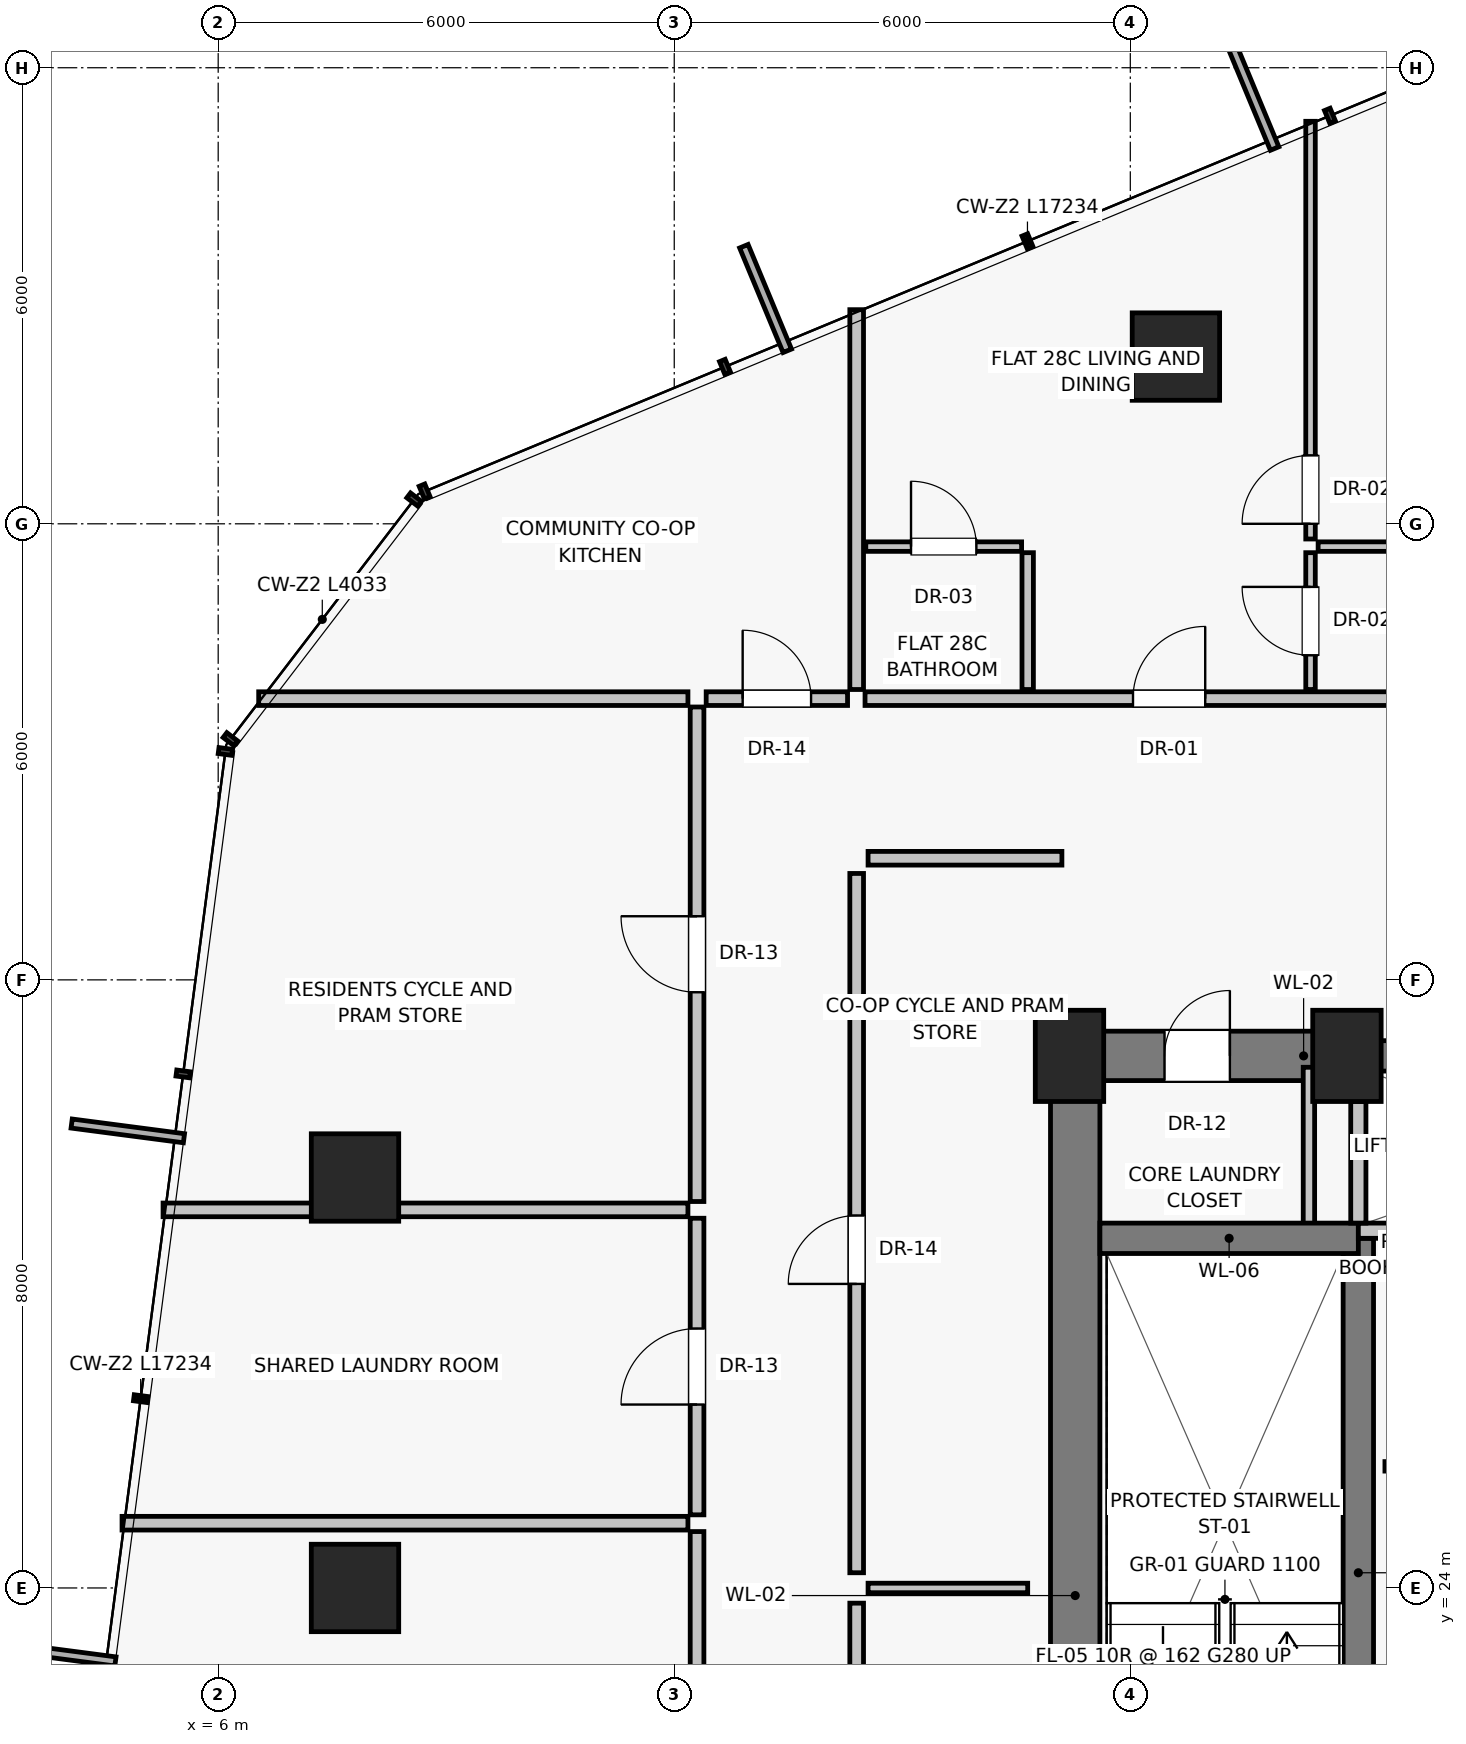
"""IFC4 building model, lengths in metres.
Left out: names, types, materials, properties, quantities, classifications, styles, units other than length and angle.
Written with IfcOpenShell. Run it as: python <this file> out.ifc"""

import sys

from ifc_helpers import new_model, si_unit, direction, frame, frame_2d, origin, origin_2d, place, context, subcontext, project, spatial, rectangle, extrude, source, transform, mapped, element, fill, save


model = new_model("IFC4")
c1 = context("Model", 3, precision=1e-05, world=origin(), true_north=direction((0.0, 1.0)))
c2 = subcontext(c1, "Body", "Model", "MODEL_VIEW")
j1 = project(units=[si_unit("LENGTHUNIT", "METRE"), si_unit("PLANEANGLEUNIT", "RADIAN")], contexts=[c1])
p1 = place(None, origin())
s1 = spatial("IfcSite", under=j1, at=p1, CompositionType="ELEMENT")
p2 = place(p1, origin())
s2 = spatial("IfcBuilding", under=s1, at=p2, CompositionType="ELEMENT")
p3 = place(p2, frame((0.0, 0.0, 102.45)))
s3 = spatial("IfcBuildingStorey", under=s2, at=p3, CompositionType="ELEMENT", Elevation=102.45)
for number, where, z_axis, x_axis in (
    (1, (17.2, 31.0, 0.0), (0.0, 0.0, 1.0), (1.0, 0.0, 0.0)),
    (2, (20.85, 31.0, 0.0), (0.0, 0.0, 1.0), (1.0, 0.0, 0.0)),
):
    element("IfcColumn", number, at=place(p3, frame(where, z_axis=z_axis, x_axis=x_axis)), inside=s3, PredefinedType="PILASTER", context=c2, shape_type="SweptSolid", body=[
        extrude(rectangle(XDim=0.9, YDim=1.2, at=origin_2d()), origin(), (0.0, 0.0, 1.0), 3.25),
    ])
for number, where, z_axis, x_axis in (
    (3, (18.6, 40.2, 0.0), (0.0, 0.0, 1.0), (1.0, 0.0, 0.0)),
    (4, (7.8, 29.4, 0.0), (0.0, 0.0, 1.0), (1.0, 0.0, 0.0)),
    (5, (7.8, 24.0, 0.0), (0.0, 0.0, 1.0), (1.0, 0.0, 0.0)),
):
    element("IfcColumn", number, at=place(p3, frame(where, z_axis=z_axis, x_axis=x_axis)), inside=s3, PredefinedType="COLUMN", context=c2, shape_type="SweptSolid", body=[
        extrude(rectangle(XDim=1.15, YDim=1.15, at=origin_2d()), origin(), (0.0, 0.0, 1.0), 3.25),
    ])
p4 = place(p3, frame((17.275, 16.8, 0.0), z_axis=(0.0, 0.0, 1.0), x_axis=(0.0, 1.0, 0.0)))
e6 = element("IfcWall", 6, at=p4, inside=s3, PredefinedType="SHEAR", context=c2, shape_type="SweptSolid", body=[
    extrude(rectangle(XDim=14.2, YDim=0.65, at=frame_2d((7.1, 0.0))), origin(), (0.0, 0.0, 1.0), 3.0),
])
p5 = place(p3, frame((17.2, 31.0, 0.0), z_axis=(0.0, 0.0, 1.0), x_axis=(1.0, 0.0, 0.0)))
e7 = element("IfcWall", 7, at=p5, inside=s3, PredefinedType="SHEAR", context=c2, shape_type="SweptSolid", body=[
    extrude(rectangle(XDim=3.8, YDim=0.65, at=frame_2d((1.9, 0.0))), origin(), (0.0, 0.0, 1.0), 3.0),
])
p6 = place(p5, frame((1.25, 0.0, 0.0)))
e8 = element("IfcOpeningElement", 8, at=p6, cuts=e7, PredefinedType="OPENING", context=c2, shape_type="SweptSolid", body=[
    extrude(rectangle(XDim=0.86, YDim=2.01, at=frame_2d((0.43, 1.005))), frame((0.0, 0.335, 0.0), z_axis=(0.0, -1.0, 0.0), x_axis=(1.0, 0.0, 0.0)), (0.0, 0.0, 1.0), 0.67),
])
p7 = place(p3, frame((21.0, 31.0, 0.0), z_axis=(0.0, 0.0, 1.0), x_axis=(1.0, 0.0, 0.0)))
e9 = element("IfcWall", 9, at=p7, inside=s3, PredefinedType="SHEAR", context=c2, shape_type="SweptSolid", body=[
    extrude(rectangle(XDim=6.0, YDim=0.4, at=frame_2d((3.0, 0.0))), origin(), (0.0, 0.0, 1.0), 3.0),
])
p8 = place(p3, frame((20.35, 28.65, 0.0), z_axis=(0.0, 0.0, 1.0), x_axis=(0.0, 1.0, 0.0)))
e10 = element("IfcWall", 10, at=p8, inside=s3, PredefinedType="PARTITIONING", context=c2, shape_type="SweptSolid", body=[
    extrude(rectangle(XDim=2.2, YDim=0.15, at=frame_2d((1.1, 0.0))), origin(), (0.0, 0.0, 1.0), 3.0),
])
p9 = place(p3, frame((21.0, 19.8, 0.0), z_axis=(0.0, 0.0, 1.0), x_axis=(0.0, 1.0, 0.0)))
e11 = element("IfcWall", 11, at=p9, inside=s3, PredefinedType="SHEAR", context=c2, shape_type="SweptSolid", body=[
    extrude(rectangle(XDim=8.8, YDim=0.4, at=frame_2d((4.4, 0.0))), origin(), (0.0, 0.0, 1.0), 3.0),
])
p10 = place(p3, frame((17.6, 28.6, 0.0), z_axis=(0.0, 0.0, 1.0), x_axis=(1.0, 0.0, 0.0)))
e12 = element("IfcWall", 12, at=p10, inside=s3, PredefinedType="SHEAR", context=c2, shape_type="SweptSolid", body=[
    extrude(rectangle(XDim=3.4, YDim=0.4, at=frame_2d((1.7, 0.0))), origin(), (0.0, 0.0, 1.0), 3.0),
])
p11 = place(p3, frame((21.0, 28.7, 0.0), z_axis=(0.0, 0.0, 1.0), x_axis=(1.0, 0.0, 0.0)))
e13 = element("IfcWall", 13, at=p11, inside=s3, PredefinedType="SOLIDWALL", context=c2, shape_type="SweptSolid", body=[
    extrude(rectangle(XDim=6.0, YDim=0.2, at=frame_2d((3.0, 0.0))), origin(), (0.0, 0.0, 1.0), 3.0),
])
p12 = place(p3, frame((21.0, 28.8, 0.0), z_axis=(0.0, 0.0, 1.0), x_axis=(0.0, 1.0, 0.0)))
e14 = element("IfcWall", 14, at=p12, inside=s3, PredefinedType="SOLIDWALL", context=c2, shape_type="SweptSolid", body=[
    extrude(rectangle(XDim=1.6, YDim=0.2, at=frame_2d((0.8, 0.0))), origin(), (0.0, 0.0, 1.0), 3.0),
])
p13 = place(p3, frame((21.35, 25.6, 0.0), z_axis=(0.0, 0.0, 1.0), x_axis=(1.0, 0.0, 0.0)))
e15 = element("IfcWall", 15, at=p13, inside=s3, PredefinedType="PARTITIONING", context=c2, shape_type="SweptSolid", body=[
    extrude(rectangle(XDim=2.4, YDim=0.125, at=frame_2d((1.2, 0.0))), origin(), (0.0, 0.0, 1.0), 3.0),
])
p14 = place(p3, frame((14.4, 14.4, 0.0), z_axis=(0.0, 0.0, 1.0), x_axis=(0.0, 1.0, 0.0)))
e16 = element("IfcWall", 16, at=p14, inside=s3, PredefinedType="PARTITIONING", context=c2, shape_type="SweptSolid", body=[
    extrude(rectangle(XDim=9.4, YDim=0.18, at=frame_2d((4.7, 0.0))), origin(), (0.0, 0.0, 1.0), 3.0),
])
p15 = place(p14, frame((3.8, 0.0, 0.0)))
e17 = element("IfcOpeningElement", 17, at=p15, cuts=e16, PredefinedType="OPENING", context=c2, shape_type="SweptSolid", body=[
    extrude(rectangle(XDim=0.9, YDim=2.01, at=frame_2d((0.45, 1.005))), frame((0.0, 0.1, 0.0), z_axis=(0.0, -1.0, 0.0), x_axis=(1.0, 0.0, 0.0)), (0.0, 0.0, 1.0), 0.2),
])
p16 = place(p3, frame((14.4, 24.2, 0.0), z_axis=(0.0, 0.0, 1.0), x_axis=(0.0, 1.0, 0.0)))
e18 = element("IfcWall", 18, at=p16, inside=s3, PredefinedType="PARTITIONING", context=c2, shape_type="SweptSolid", body=[
    extrude(rectangle(XDim=9.2, YDim=0.18, at=frame_2d((4.6, 0.0))), origin(), (0.0, 0.0, 1.0), 3.0),
])
p17 = place(p16, frame((3.8, 0.0, 0.0)))
e19 = element("IfcOpeningElement", 19, at=p17, cuts=e18, PredefinedType="OPENING", context=c2, shape_type="SweptSolid", body=[
    extrude(rectangle(XDim=0.9, YDim=2.01, at=frame_2d((0.45, 1.005))), frame((0.0, 0.1, 0.0), z_axis=(0.0, -1.0, 0.0), x_axis=(1.0, 0.0, 0.0)), (0.0, 0.0, 1.0), 0.2),
])
p18 = place(p3, frame((14.55, 24.0, 0.0), z_axis=(0.0, 0.0, 1.0), x_axis=(1.0, 0.0, 0.0)))
e20 = element("IfcWall", 20, at=p18, inside=s3, PredefinedType="PARTITIONING", context=c2, shape_type="SweptSolid", body=[
    extrude(rectangle(XDim=2.1, YDim=0.125, at=frame_2d((1.05, 0.0))), origin(), (0.0, 0.0, 1.0), 3.0),
])
p19 = place(p3, frame((14.55, 33.6, 0.0), z_axis=(0.0, 0.0, 1.0), x_axis=(1.0, 0.0, 0.0)))
e21 = element("IfcWall", 21, at=p19, inside=s3, PredefinedType="PARTITIONING", context=c2, shape_type="SweptSolid", body=[
    extrude(rectangle(XDim=2.55, YDim=0.18, at=frame_2d((1.275, 0.0))), origin(), (0.0, 0.0, 1.0), 3.0),
])
p20 = place(p3, frame((14.4, 35.82, 0.0), z_axis=(0.0, 0.0, 1.0), x_axis=(0.0, 1.0, 0.0)))
e22 = element("IfcWall", 22, at=p20, inside=s3, PredefinedType="PARTITIONING", context=c2, shape_type="SweptSolid", body=[
    extrude(rectangle(XDim=4.997, YDim=0.18, at=frame_2d((2.499, 0.0))), origin(), (0.0, 0.0, 1.0), 3.0),
])
p21 = place(p3, frame((14.51, 35.7, 0.0), z_axis=(0.0, 0.0, 1.0), x_axis=(1.0, 0.0, 0.0)))
e23 = element("IfcWall", 23, at=p21, inside=s3, PredefinedType="PARTITIONING", context=c2, shape_type="SweptSolid", body=[
    extrude(rectangle(XDim=10.636, YDim=0.18, at=frame_2d((5.318, 0.0))), origin(), (0.0, 0.0, 1.0), 2.58),
])
p22 = place(p21, frame((3.525, 0.0, 0.0)))
e24 = element("IfcOpeningElement", 24, at=p22, cuts=e23, PredefinedType="OPENING", context=c2, shape_type="SweptSolid", body=[
    extrude(rectangle(XDim=0.95, YDim=2.02, at=frame_2d((0.475, 1.01))), frame((0.0, 0.1, 0.0), z_axis=(0.0, -1.0, 0.0), x_axis=(1.0, 0.0, 0.0)), (0.0, 0.0, 1.0), 0.2),
])
p23 = place(p3, frame((16.65, 35.82, 0.0), z_axis=(0.0, 0.0, 1.0), x_axis=(0.0, 1.0, 0.0)))
e25 = element("IfcWall", 25, at=p23, inside=s3, PredefinedType="PARTITIONING", context=c2, shape_type="SweptSolid", body=[
    extrude(rectangle(XDim=1.8, YDim=0.15, at=frame_2d((0.9, 0.0))), origin(), (0.0, 0.0, 1.0), 3.0),
])
p24 = place(p3, frame((14.52, 37.7, 0.0), z_axis=(0.0, 0.0, 1.0), x_axis=(1.0, 0.0, 0.0)))
e26 = element("IfcWall", 26, at=p24, inside=s3, PredefinedType="PARTITIONING", context=c2, shape_type="SweptSolid", body=[
    extrude(rectangle(XDim=2.05, YDim=0.125, at=frame_2d((1.025, 0.0))), origin(), (0.0, 0.0, 1.0), 3.0),
])
p25 = place(p24, frame((0.595, 0.0, 0.0)))
e27 = element("IfcOpeningElement", 27, at=p25, cuts=e26, PredefinedType="OPENING", context=c2, shape_type="SweptSolid", body=[
    extrude(rectangle(XDim=0.86, YDim=2.01, at=frame_2d((0.43, 1.005))), frame((0.0, 0.073, 0.0), z_axis=(0.0, -1.0, 0.0), x_axis=(1.0, 0.0, 0.0)), (0.0, 0.0, 1.0), 0.145),
])
p26 = place(p3, frame((20.371, 35.82, 0.0), z_axis=(0.0, 0.0, 1.0), x_axis=(0.0, 1.0, 0.0)))
e28 = element("IfcWall", 28, at=p26, inside=s3, PredefinedType="PARTITIONING", context=c2, shape_type="SweptSolid", body=[
    extrude(rectangle(XDim=1.8, YDim=0.125, at=frame_2d((0.9, 0.0))), origin(), (0.0, 0.0, 1.0), 3.0),
])
p27 = place(p26, frame((0.45, 0.0, 0.0)))
e29 = element("IfcOpeningElement", 29, at=p27, cuts=e28, PredefinedType="OPENING", context=c2, shape_type="SweptSolid", body=[
    extrude(rectangle(XDim=0.9, YDim=2.01, at=frame_2d((0.45, 1.005))), frame((0.0, 0.073, 0.0), z_axis=(0.0, -1.0, 0.0), x_axis=(1.0, 0.0, 0.0)), (0.0, 0.0, 1.0), 0.145),
])
p28 = place(p3, frame((20.471, 37.7, 0.0), z_axis=(0.0, 0.0, 1.0), x_axis=(1.0, 0.0, 0.0)))
e30 = element("IfcWall", 30, at=p28, inside=s3, PredefinedType="PARTITIONING", context=c2, shape_type="SweptSolid", body=[
    extrude(rectangle(XDim=4.665, YDim=0.125, at=frame_2d((2.333, 0.0))), origin(), (0.0, 0.0, 1.0), 3.0),
])
p29 = place(p3, frame((20.371, 37.8, 0.0), z_axis=(0.0, 0.0, 1.0), x_axis=(0.0, 1.0, 0.0)))
e31 = element("IfcWall", 31, at=p29, inside=s3, PredefinedType="PARTITIONING", context=c2, shape_type="SweptSolid", body=[
    extrude(rectangle(XDim=5.495, YDim=0.125, at=frame_2d((2.748, 0.0))), origin(), (0.0, 0.0, 1.0), 3.0),
])
p30 = place(p29, frame((0.2, 0.0, 0.0)))
e32 = element("IfcOpeningElement", 32, at=p30, cuts=e31, PredefinedType="OPENING", context=c2, shape_type="SweptSolid", body=[
    extrude(rectangle(XDim=0.9, YDim=2.01, at=frame_2d((0.45, 1.005))), frame((0.0, 0.073, 0.0), z_axis=(0.0, -1.0, 0.0), x_axis=(1.0, 0.0, 0.0)), (0.0, 0.0, 1.0), 0.145),
])
p31 = place(p3, frame((12.18, 35.7, 0.0), z_axis=(0.0, 0.0, 1.0), x_axis=(-1.0, 0.0, 0.0)))
e33 = element("IfcWall", 33, at=p31, inside=s3, PredefinedType="PARTITIONING", context=c2, shape_type="SweptSolid", body=[
    extrude(rectangle(XDim=5.647, YDim=0.18, at=frame_2d((2.824, 0.0))), origin(), (0.0, 0.0, 1.0), 3.0),
])
p32 = place(p3, frame((12.3, 17.056, 0.0), z_axis=(0.0, 0.0, 1.0), x_axis=(0.0, 1.0, 0.0)))
e34 = element("IfcWall", 34, at=p32, inside=s3, PredefinedType="PARTITIONING", context=c2, shape_type="SweptSolid", body=[
    extrude(rectangle(XDim=7.686, YDim=0.18, at=frame_2d((3.843, 0.0))), origin(), (0.0, 0.0, 1.0), 2.58),
])
p33 = place(p32, frame((3.343, 0.0, 0.0)))
e35 = element("IfcOpeningElement", 35, at=p33, cuts=e34, PredefinedType="OPENING", context=c2, shape_type="SweptSolid", body=[
    extrude(rectangle(XDim=1.0, YDim=2.01, at=frame_2d((0.5, 1.005))), frame((0.0, 0.1, 0.0), z_axis=(0.0, -1.0, 0.0), x_axis=(1.0, 0.0, 0.0)), (0.0, 0.0, 1.0), 0.2),
])
p34 = place(p3, frame((12.18, 24.852, 0.0), z_axis=(0.0, 0.0, 1.0), x_axis=(-1.0, 0.0, 0.0)))
e36 = element("IfcWall", 36, at=p34, inside=s3, PredefinedType="PARTITIONING", context=c2, shape_type="SweptSolid", body=[
    extrude(rectangle(XDim=7.445, YDim=0.18, at=frame_2d((3.722, 0.0))), origin(), (0.0, 0.0, 1.0), 3.0),
])
p35 = place(p3, frame((12.3, 24.962, 0.0), z_axis=(0.0, 0.0, 1.0), x_axis=(0.0, 1.0, 0.0)))
e37 = element("IfcWall", 37, at=p35, inside=s3, PredefinedType="PARTITIONING", context=c2, shape_type="SweptSolid", body=[
    extrude(rectangle(XDim=3.902, YDim=0.18, at=frame_2d((1.951, 0.0))), origin(), (0.0, 0.0, 1.0), 2.58),
])
p36 = place(p35, frame((1.451, 0.0, 0.0)))
e38 = element("IfcOpeningElement", 38, at=p36, cuts=e37, PredefinedType="OPENING", context=c2, shape_type="SweptSolid", body=[
    extrude(rectangle(XDim=1.0, YDim=2.01, at=frame_2d((0.5, 1.005))), frame((0.0, 0.1, 0.0), z_axis=(0.0, -1.0, 0.0), x_axis=(1.0, 0.0, 0.0)), (0.0, 0.0, 1.0), 0.2),
])
p37 = place(p3, frame((12.3, 29.084, 0.0), z_axis=(0.0, 0.0, 1.0), x_axis=(0.0, 1.0, 0.0)))
e39 = element("IfcWall", 39, at=p37, inside=s3, PredefinedType="PARTITIONING", context=c2, shape_type="SweptSolid", body=[
    extrude(rectangle(XDim=6.506, YDim=0.18, at=frame_2d((3.253, 0.0))), origin(), (0.0, 0.0, 1.0), 2.58),
])
p38 = place(p37, frame((2.753, 0.0, 0.0)))
e40 = element("IfcOpeningElement", 40, at=p38, cuts=e39, PredefinedType="OPENING", context=c2, shape_type="SweptSolid", body=[
    extrude(rectangle(XDim=1.0, YDim=2.01, at=frame_2d((0.5, 1.005))), frame((0.0, 0.1, 0.0), z_axis=(0.0, -1.0, 0.0), x_axis=(1.0, 0.0, 0.0)), (0.0, 0.0, 1.0), 0.2),
])
p39 = place(p3, frame((12.18, 28.974, 0.0), z_axis=(0.0, 0.0, 1.0), x_axis=(-1.0, 0.0, 0.0)))
e41 = element("IfcWall", 41, at=p39, inside=s3, PredefinedType="PARTITIONING", context=c2, shape_type="SweptSolid", body=[
    extrude(rectangle(XDim=6.905, YDim=0.18, at=frame_2d((3.453, 0.0))), origin(), (0.0, 0.0, 1.0), 2.378),
])
p40 = place(p3, frame((12.42, 35.7, 0.0), z_axis=(0.0, 0.0, 1.0), x_axis=(1.0, 0.0, 0.0)))
e42 = element("IfcWall", 42, at=p40, inside=s3, PredefinedType="PARTITIONING", context=c2, shape_type="SweptSolid", body=[
    extrude(rectangle(XDim=1.86, YDim=0.18, at=frame_2d((0.93, 0.0))), origin(), (0.0, 0.0, 1.0), 3.0),
])
p41 = place(p40, frame((0.48, 0.0, 0.0)))
e43 = element("IfcOpeningElement", 43, at=p41, cuts=e42, PredefinedType="OPENING", context=c2, shape_type="SweptSolid", body=[
    extrude(rectangle(XDim=0.9, YDim=2.01, at=frame_2d((0.45, 1.005))), frame((0.0, 0.1, 0.0), z_axis=(0.0, -1.0, 0.0), x_axis=(1.0, 0.0, 0.0)), (0.0, 0.0, 1.0), 0.2),
])
m1 = source(origin(), c2, "Body", "SweptSolid", [
    extrude(rectangle(XDim=0.86, YDim=2.01, at=frame_2d((0.43, 1.005))), frame((0.0, 0.025, 0.0), z_axis=(0.0, -1.0, 0.0), x_axis=(1.0, 0.0, 0.0)), (0.0, 0.0, 1.0), 0.05),
])
p42 = place(p6, origin())
e44 = element("IfcDoor", 44, at=p42, inside=s3, OperationType="SINGLE_SWING_RIGHT", PredefinedType="DOOR", context=c2, shape_type="MappedRepresentation", body=[
    mapped(m1, transform((0.0, 0.0, 0.0), scale=1.0)),
])
fill(e8, e44)
m2 = source(origin(), c2, "Body", "SweptSolid", [
    extrude(rectangle(XDim=0.9, YDim=2.01, at=frame_2d((0.45, 1.005))), frame((0.0, 0.025, 0.0), z_axis=(0.0, -1.0, 0.0), x_axis=(1.0, 0.0, 0.0)), (0.0, 0.0, 1.0), 0.05),
])
p43 = place(p17, origin())
e45 = element("IfcDoor", 45, at=p43, inside=s3, OperationType="SINGLE_SWING_LEFT", PredefinedType="DOOR", context=c2, shape_type="MappedRepresentation", body=[
    mapped(m2, transform((0.0, 0.0, 0.0), scale=1.0)),
])
fill(e19, e45)
m3 = source(origin(), c2, "Body", "SweptSolid", [
    extrude(rectangle(XDim=0.95, YDim=2.02, at=frame_2d((0.475, 1.01))), frame((0.0, 0.025, 0.0), z_axis=(0.0, -1.0, 0.0), x_axis=(1.0, 0.0, 0.0)), (0.0, 0.0, 1.0), 0.05),
])
p44 = place(p22, origin())
e46 = element("IfcDoor", 46, at=p44, inside=s3, OperationType="SINGLE_SWING_RIGHT", PredefinedType="DOOR", context=c2, shape_type="MappedRepresentation", body=[
    mapped(m3, transform((0.0, 0.0, 0.0), scale=1.0)),
])
fill(e24, e46)
p45 = place(p25, origin())
e47 = element("IfcDoor", 47, at=p45, inside=s3, OperationType="SINGLE_SWING_LEFT", PredefinedType="DOOR", context=c2, shape_type="MappedRepresentation", body=[
    mapped(m1, transform((0.0, 0.0, 0.0), scale=1.0)),
])
fill(e27, e47)
p46 = place(p27, origin())
e48 = element("IfcDoor", 48, at=p46, inside=s3, OperationType="SINGLE_SWING_RIGHT", PredefinedType="DOOR", context=c2, shape_type="MappedRepresentation", body=[
    mapped(m2, transform((0.0, 0.0, 0.0), scale=1.0)),
])
fill(e29, e48)
p47 = place(p30, origin())
e49 = element("IfcDoor", 49, at=p47, inside=s3, OperationType="SINGLE_SWING_LEFT", PredefinedType="DOOR", context=c2, shape_type="MappedRepresentation", body=[
    mapped(m2, transform((0.0, 0.0, 0.0), scale=1.0)),
])
fill(e32, e49)
m4 = source(origin(), c2, "Body", "SweptSolid", [
    extrude(rectangle(XDim=1.0, YDim=2.01, at=frame_2d((0.5, 1.005))), frame((0.0, 0.025, 0.0), z_axis=(0.0, -1.0, 0.0), x_axis=(1.0, 0.0, 0.0)), (0.0, 0.0, 1.0), 0.05),
])
p48 = place(p36, origin())
e50 = element("IfcDoor", 50, at=p48, inside=s3, OperationType="SINGLE_SWING_LEFT", PredefinedType="DOOR", context=c2, shape_type="MappedRepresentation", body=[
    mapped(m4, transform((0.0, 0.0, 0.0), scale=1.0)),
])
fill(e38, e50)
p49 = place(p38, origin())
e51 = element("IfcDoor", 51, at=p49, inside=s3, OperationType="SINGLE_SWING_RIGHT", PredefinedType="DOOR", context=c2, shape_type="MappedRepresentation", body=[
    mapped(m4, transform((0.0, 0.0, 0.0), scale=1.0)),
])
fill(e40, e51)
p50 = place(p41, origin())
e52 = element("IfcDoor", 52, at=p50, inside=s3, OperationType="SINGLE_SWING_LEFT", PredefinedType="DOOR", context=c2, shape_type="MappedRepresentation", body=[
    mapped(m2, transform((0.0, 0.0, 0.0), scale=1.0)),
])
fill(e43, e52)
save(model, sys.argv[1])
